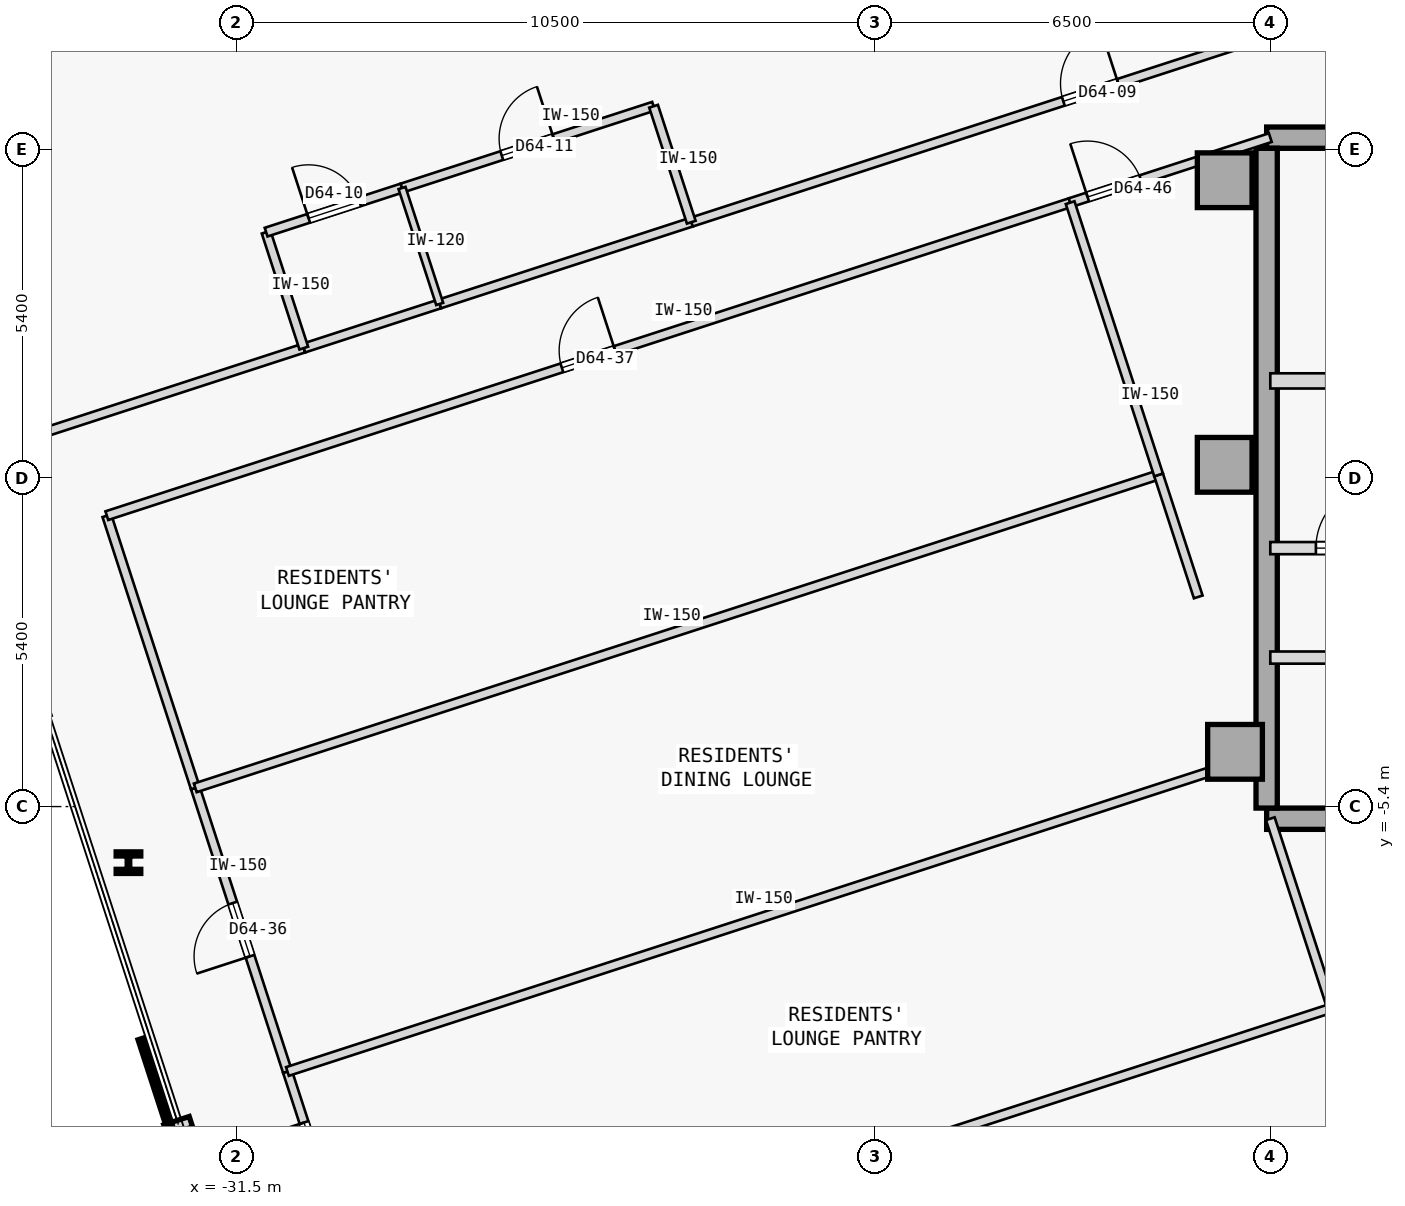
"""IFC4 building model, lengths in metres.
Left out: names, types, materials, properties, quantities, classifications, styles, units other than length and angle.
Written with IfcOpenShell. Run it as: python <this file> out.ifc"""

import sys

from ifc_helpers import new_model, si_unit, direction, frame, frame_2d, origin, origin_2d, place, context, subcontext, project, spatial, rectangle, i_section, extrude, element, fill, save


model = new_model("IFC4")
c1 = context("Model", 3, precision=1e-05, world=origin(), true_north=direction((0.0, 1.0)))
c2 = subcontext(c1, "Body", "Model", "MODEL_VIEW")
j1 = project(units=[si_unit("LENGTHUNIT", "METRE"), si_unit("PLANEANGLEUNIT", "RADIAN")], contexts=[c1])
p1 = place(None, origin())
s1 = spatial("IfcSite", under=j1, at=p1, CompositionType="ELEMENT")
p2 = place(p1, origin())
s2 = spatial("IfcBuilding", under=s1, at=p2, CompositionType="ELEMENT")
p3 = place(p2, frame((0.0, 0.0, 241.05)))
s3 = spatial("IfcBuildingStorey", under=s2, at=p3, CompositionType="ELEMENT", Elevation=241.05)
for number, where, z_axis, x_axis in (
    (1, (-15.25, 4.9, 0.0), (0.0, 0.0, 1.0), (1.0, 0.0, 0.0)),
    (2, (-15.25, 0.22, 0.0), (0.0, 0.0, 1.0), (1.0, 0.0, 0.0)),
    (3, (-15.08, -4.5, 0.0), (0.0, 0.0, 1.0), (1.0, 0.0, 0.0)),
):
    element("IfcColumn", number, at=place(p3, frame(where, z_axis=z_axis, x_axis=x_axis)), inside=s3, PredefinedType="COLUMN", context=c2, shape_type="SweptSolid", body=[
        extrude(rectangle(XDim=0.9, YDim=0.9, at=origin_2d()), origin(), (0.0, 0.0, 1.0), 3.35),
    ])
p4 = place(p3, frame((-14.56, 5.6, 0.0), z_axis=(0.0, 0.0, 1.0), x_axis=(1.0, 0.0, 0.0)))
e4 = element("IfcWall", 4, at=p4, inside=s3, PredefinedType="SHEAR", context=c2, shape_type="SweptSolid", body=[
    extrude(rectangle(XDim=11.41, YDim=0.35, at=frame_2d((5.705, 0.0))), origin(), (0.0, 0.0, 1.0), 3.125),
])
p5 = place(p3, frame((-14.56, -5.6, 0.0), z_axis=(0.0, 0.0, 1.0), x_axis=(1.0, 0.0, 0.0)))
e5 = element("IfcWall", 5, at=p5, inside=s3, PredefinedType="SHEAR", context=c2, shape_type="SweptSolid", body=[
    extrude(rectangle(XDim=10.86, YDim=0.35, at=frame_2d((5.43, 0.0))), origin(), (0.0, 0.0, 1.0), 3.125),
])
p6 = place(p3, frame((-14.56, -5.425, 0.0), z_axis=(0.0, 0.0, 1.0), x_axis=(0.0, 1.0, 0.0)))
e6 = element("IfcWall", 6, at=p6, inside=s3, PredefinedType="SHEAR", context=c2, shape_type="SweptSolid", body=[
    extrude(rectangle(XDim=10.85, YDim=0.35, at=frame_2d((5.425, 0.0))), origin(), (0.0, 0.0, 1.0), 3.125),
])
p7 = place(p3, frame((-33.278, -6.322, 0.0), z_axis=(0.0, 0.0, 1.0), x_axis=(1.0, 0.0, 0.0)))
e7 = element("IfcColumn", 7, at=p7, inside=s3, PredefinedType="COLUMN", context=c2, shape_type="SweptSolid", body=[
    extrude(i_section(OverallWidth=0.405, OverallDepth=0.355, WebThickness=0.042, FlangeThickness=0.068, FilletRadius=0.015, at=origin_2d()), origin(), (0.0, 0.0, 1.0), 3.35),
])
p8 = place(p3, frame((-14.5, 1.6, 0.0), z_axis=(0.0, 0.0, 1.0), x_axis=(1.0, 0.0, 0.0)))
e8 = element("IfcWall", 8, at=p8, inside=s3, PredefinedType="STANDARD", context=c2, shape_type="SweptSolid", body=[
    extrude(rectangle(XDim=3.6, YDim=0.25, at=frame_2d((1.8, 0.0))), origin(), (0.0, 0.0, 1.0), 3.125),
])
p9 = place(p8, frame((0.92, 0.0, 0.0)))
e9 = element("IfcOpeningElement", 9, at=p9, cuts=e8, PredefinedType="OPENING", context=c2, shape_type="SweptSolid", body=[
    extrude(rectangle(XDim=1.05, YDim=2.15, at=frame_2d((0.525, 1.075))), frame((0.0, 0.135, 0.0), z_axis=(0.0, -1.0, 0.0), x_axis=(1.0, 0.0, 0.0)), (0.0, 0.0, 1.0), 0.27),
])
p10 = place(p3, frame((-14.5, -1.15, 0.0), z_axis=(0.0, 0.0, 1.0), x_axis=(1.0, 0.0, 0.0)))
e10 = element("IfcWall", 10, at=p10, inside=s3, PredefinedType="STANDARD", context=c2, shape_type="SweptSolid", body=[
    extrude(rectangle(XDim=2.95, YDim=0.2, at=frame_2d((1.475, 0.0))), origin(), (0.0, 0.0, 1.0), 3.125),
])
p11 = place(p10, frame((0.75, 0.0, 0.0)))
e11 = element("IfcOpeningElement", 11, at=p11, cuts=e10, PredefinedType="OPENING", context=c2, shape_type="SweptSolid", body=[
    extrude(rectangle(XDim=1.05, YDim=2.18, at=frame_2d((0.525, 1.09))), frame((0.0, 0.11, 0.0), z_axis=(0.0, -1.0, 0.0), x_axis=(1.0, 0.0, 0.0)), (0.0, 0.0, 1.0), 0.22),
])
p12 = place(p3, frame((-14.5, -2.95, 0.0), z_axis=(0.0, 0.0, 1.0), x_axis=(1.0, 0.0, 0.0)))
e12 = element("IfcWall", 12, at=p12, inside=s3, PredefinedType="STANDARD", context=c2, shape_type="SweptSolid", body=[
    extrude(rectangle(XDim=10.8, YDim=0.2, at=frame_2d((5.4, 0.0))), origin(), (0.0, 0.0, 1.0), 3.125),
])
p13 = place(p12, frame((9.17, 0.0, 0.0)))
e13 = element("IfcOpeningElement", 13, at=p13, cuts=e12, PredefinedType="OPENING", context=c2, shape_type="SweptSolid", body=[
    extrude(rectangle(XDim=1.1, YDim=2.15, at=frame_2d((0.55, 1.075))), frame((0.0, 0.11, 0.0), z_axis=(0.0, -1.0, 0.0), x_axis=(1.0, 0.0, 0.0)), (0.0, 0.0, 1.0), 0.22),
])
p14 = place(p12, frame((2.13, 0.0, 0.0)))
e14 = element("IfcOpeningElement", 14, at=p14, cuts=e12, PredefinedType="OPENING", context=c2, shape_type="SweptSolid", body=[
    extrude(rectangle(XDim=0.92, YDim=2.15, at=frame_2d((0.46, 1.075))), frame((0.0, 0.11, 0.0), z_axis=(0.0, -1.0, 0.0), x_axis=(1.0, 0.0, 0.0)), (0.0, 0.0, 1.0), 0.22),
])
p15 = place(p12, frame((6.45, 0.0, 0.0)))
e15 = element("IfcOpeningElement", 15, at=p15, cuts=e12, PredefinedType="OPENING", context=c2, shape_type="SweptSolid", body=[
    extrude(rectangle(XDim=0.92, YDim=2.15, at=frame_2d((0.46, 1.075))), frame((0.0, 0.11, 0.0), z_axis=(0.0, -1.0, 0.0), x_axis=(1.0, 0.0, 0.0)), (0.0, 0.0, 1.0), 0.22),
])
p16 = place(p3, frame((-36.012, 0.314, 0.0), z_axis=(0.0, 0.0, 1.0), x_axis=(0.951065348244, 0.308989811111, 0.0)))
e16 = element("IfcWall", 16, at=p16, inside=s3, PredefinedType="PARTITIONING", context=c2, shape_type="SweptSolid", body=[
    extrude(rectangle(XDim=5.907, YDim=0.15, at=frame_2d((2.954, 0.0))), origin(), (0.0, 0.0, 1.0), 3.125),
])
p17 = place(p3, frame((-24.022, 4.21, 0.0), z_axis=(0.0, 0.0, 1.0), x_axis=(0.951058997127, 0.309009359055, 0.0)))
e17 = element("IfcWall", 17, at=p17, inside=s3, PredefinedType="PARTITIONING", context=c2, shape_type="SweptSolid", body=[
    extrude(rectangle(XDim=13.817, YDim=0.15, at=frame_2d((6.908, 0.0))), origin(), (0.0, 0.0, 1.0), 3.125),
])
p18 = place(p17, frame((6.434, 0.0, 0.0)))
e18 = element("IfcOpeningElement", 18, at=p18, cuts=e17, PredefinedType="OPENING", context=c2, shape_type="SweptSolid", body=[
    extrude(rectangle(XDim=0.95, YDim=2.15, at=frame_2d((0.475, 1.075))), frame((0.0, 0.085, 0.0), z_axis=(0.0, -1.0, 0.0), x_axis=(1.0, 0.0, 0.0)), (0.0, 0.0, 1.0), 0.17),
])
p19 = place(p3, frame((-30.394, 2.139, 0.0), z_axis=(0.0, 0.0, 1.0), x_axis=(0.951045519245, 0.309050837767, 0.0)))
e19 = element("IfcWall", 19, at=p19, inside=s3, PredefinedType="PARTITIONING", context=c2, shape_type="SweptSolid", body=[
    extrude(rectangle(XDim=2.35, YDim=0.15, at=frame_2d((1.175, 0.0))), origin(), (0.0, 0.0, 1.0), 3.125),
])
p20 = place(p3, frame((-28.159, 2.866, 0.0), z_axis=(0.0, 0.0, 1.0), x_axis=(0.951052627573, 0.309028962374, 0.0)))
e20 = element("IfcWall", 20, at=p20, inside=s3, PredefinedType="PARTITIONING", context=c2, shape_type="SweptSolid", body=[
    extrude(rectangle(XDim=4.35, YDim=0.15, at=frame_2d((2.175, 0.0))), origin(), (0.0, 0.0, 1.0), 3.125),
])
p21 = place(p3, frame((-29.833, -12.311, 0.0), z_axis=(0.0, 0.0, 1.0), x_axis=(-0.309044953986, 0.951047431213, 0.0)))
e21 = element("IfcWall", 21, at=p21, inside=s3, PredefinedType="PARTITIONING", context=c2, shape_type="SweptSolid", body=[
    extrude(rectangle(XDim=2.685, YDim=0.15, at=frame_2d((1.343, 0.0))), origin(), (0.0, 0.0, 1.0), 3.125),
])
p22 = place(p21, frame((0.883, 0.0, 0.0)))
e22 = element("IfcOpeningElement", 22, at=p22, cuts=e21, PredefinedType="OPENING", context=c2, shape_type="SweptSolid", body=[
    extrude(rectangle(XDim=0.92, YDim=2.15, at=frame_2d((0.46, 1.075))), frame((0.0, 0.085, 0.0), z_axis=(0.0, -1.0, 0.0), x_axis=(1.0, 0.0, 0.0)), (0.0, 0.0, 1.0), 0.17),
])
p23 = place(p3, frame((-30.663, -9.757, 0.0), z_axis=(0.0, 0.0, 1.0), x_axis=(-0.309019653166, 0.951055652397, 0.0)))
e23 = element("IfcWall", 23, at=p23, inside=s3, PredefinedType="PARTITIONING", context=c2, shape_type="SweptSolid", body=[
    extrude(rectangle(XDim=4.904, YDim=0.15, at=frame_2d((2.452, 0.0))), origin(), (0.0, 0.0, 1.0), 3.125),
])
p24 = place(p23, frame((1.992, 0.0, 0.0)))
e24 = element("IfcOpeningElement", 24, at=p24, cuts=e23, PredefinedType="OPENING", context=c2, shape_type="SweptSolid", body=[
    extrude(rectangle(XDim=0.92, YDim=2.15, at=frame_2d((0.46, 1.075))), frame((0.0, 0.085, 0.0), z_axis=(0.0, -1.0, 0.0), x_axis=(1.0, 0.0, 0.0)), (0.0, 0.0, 1.0), 0.17),
])
p25 = place(p3, frame((-32.179, -5.093, 0.0), z_axis=(0.0, 0.0, 1.0), x_axis=(-0.309014532869, 0.951057316083, 0.0)))
e25 = element("IfcWall", 25, at=p25, inside=s3, PredefinedType="PARTITIONING", context=c2, shape_type="SweptSolid", body=[
    extrude(rectangle(XDim=4.707, YDim=0.15, at=frame_2d((2.354, 0.0))), origin(), (0.0, 0.0, 1.0), 3.125),
])
p26 = place(p3, frame((-33.633, -0.616, 0.0), z_axis=(0.0, 0.0, 1.0), x_axis=(0.951058192995, 0.309011833974, 0.0)))
e26 = element("IfcWall", 26, at=p26, inside=s3, PredefinedType="PARTITIONING", context=c2, shape_type="SweptSolid", body=[
    extrude(rectangle(XDim=16.657, YDim=0.15, at=frame_2d((8.329, 0.0))), origin(), (0.0, 0.0, 1.0), 3.125),
])
p27 = place(p26, frame((7.868, 0.0, 0.0)))
e27 = element("IfcOpeningElement", 27, at=p27, cuts=e26, PredefinedType="OPENING", context=c2, shape_type="SweptSolid", body=[
    extrude(rectangle(XDim=0.92, YDim=2.15, at=frame_2d((0.46, 1.075))), frame((0.0, 0.085, 0.0), z_axis=(0.0, -1.0, 0.0), x_axis=(1.0, 0.0, 0.0)), (0.0, 0.0, 1.0), 0.17),
])
p28 = place(p3, frame((-17.792, 4.531, 0.0), z_axis=(0.0, 0.0, 1.0), x_axis=(0.951047546178, 0.309044600193, 0.0)))
e28 = element("IfcWall", 28, at=p28, inside=s3, PredefinedType="PARTITIONING", context=c2, shape_type="SweptSolid", body=[
    extrude(rectangle(XDim=3.461, YDim=0.15, at=frame_2d((1.73, 0.0))), origin(), (0.0, 0.0, 1.0), 3.125),
])
p29 = place(p28, frame((0.302, 0.0, 0.0)))
e29 = element("IfcOpeningElement", 29, at=p29, cuts=e28, PredefinedType="OPENING", context=c2, shape_type="SweptSolid", body=[
    extrude(rectangle(XDim=0.92, YDim=2.15, at=frame_2d((0.46, 1.075))), frame((0.0, 0.085, 0.0), z_axis=(0.0, -1.0, 0.0), x_axis=(1.0, 0.0, 0.0)), (0.0, 0.0, 1.0), 0.17),
])
p30 = place(p3, frame((-30.394, 2.139, 0.0), z_axis=(0.0, 0.0, 1.0), x_axis=(-0.309022749039, 0.951054646472, 0.0)))
e30 = element("IfcWall", 30, at=p30, inside=s3, PredefinedType="PARTITIONING", context=c2, shape_type="SweptSolid", body=[
    extrude(rectangle(XDim=2.005, YDim=0.15, at=frame_2d((1.002, 0.0))), origin(), (0.0, 0.0, 1.0), 3.125),
])
p31 = place(p3, frame((-31.014, 4.046, 0.0), z_axis=(0.0, 0.0, 1.0), x_axis=(0.951076048914, 0.308956872689, 0.0)))
e31 = element("IfcWall", 31, at=p31, inside=s3, PredefinedType="PARTITIONING", context=c2, shape_type="SweptSolid", body=[
    extrude(rectangle(XDim=2.35, YDim=0.15, at=frame_2d((1.175, 0.0))), origin(), (0.0, 0.0, 1.0), 3.125),
])
p32 = place(p31, frame((0.735, 0.0, 0.0)))
e32 = element("IfcOpeningElement", 32, at=p32, cuts=e31, PredefinedType="OPENING", context=c2, shape_type="SweptSolid", body=[
    extrude(rectangle(XDim=0.88, YDim=2.15, at=frame_2d((0.44, 1.075))), frame((0.0, 0.085, 0.0), z_axis=(0.0, -1.0, 0.0), x_axis=(1.0, 0.0, 0.0)), (0.0, 0.0, 1.0), 0.17),
])
p33 = place(p3, frame((-28.779, 4.772, 0.0), z_axis=(0.0, 0.0, 1.0), x_axis=(0.951052627573, 0.309028962374, 0.0)))
e33 = element("IfcWall", 33, at=p33, inside=s3, PredefinedType="PARTITIONING", context=c2, shape_type="SweptSolid", body=[
    extrude(rectangle(XDim=4.35, YDim=0.15, at=frame_2d((2.175, 0.0))), origin(), (0.0, 0.0, 1.0), 3.125),
])
p34 = place(p33, frame((1.725, 0.0, 0.0)))
e34 = element("IfcOpeningElement", 34, at=p34, cuts=e33, PredefinedType="OPENING", context=c2, shape_type="SweptSolid", body=[
    extrude(rectangle(XDim=0.9, YDim=2.15, at=frame_2d((0.45, 1.075))), frame((0.0, 0.085, 0.0), z_axis=(0.0, -1.0, 0.0), x_axis=(1.0, 0.0, 0.0)), (0.0, 0.0, 1.0), 0.17),
])
p35 = place(p3, frame((-24.022, 4.21, 0.0), z_axis=(0.0, 0.0, 1.0), x_axis=(-0.309058537449, 0.951043017129, 0.0)))
e35 = element("IfcWall", 35, at=p35, inside=s3, PredefinedType="PARTITIONING", context=c2, shape_type="SweptSolid", body=[
    extrude(rectangle(XDim=2.005, YDim=0.15, at=frame_2d((1.002, 0.0))), origin(), (0.0, 0.0, 1.0), 3.125),
])
p36 = place(p3, frame((-28.159, 2.866, 0.0), z_axis=(0.0, 0.0, 1.0), x_axis=(-0.309058537449, 0.951043017129, 0.0)))
e36 = element("IfcWall", 36, at=p36, inside=s3, PredefinedType="PARTITIONING", context=c2, shape_type="SweptSolid", body=[
    extrude(rectangle(XDim=2.005, YDim=0.12, at=frame_2d((1.002, 0.0))), origin(), (0.0, 0.0, 1.0), 3.125),
])
p37 = place(p3, frame((-31.208, -14.471, 0.0), z_axis=(0.0, 0.0, 1.0), x_axis=(0.951057753948, 0.309013185244, 0.0)))
e37 = element("IfcWall", 37, at=p37, inside=s3, PredefinedType="PARTITIONING", context=c2, shape_type="SweptSolid", body=[
    extrude(rectangle(XDim=18.632, YDim=0.15, at=frame_2d((9.316, 0.0))), origin(), (0.0, 0.0, 1.0), 3.125),
])
p38 = place(p3, frame((-30.663, -9.757, 0.0), z_axis=(0.0, 0.0, 1.0), x_axis=(0.951058192995, 0.309011833974, 0.0)))
e38 = element("IfcWall", 38, at=p38, inside=s3, PredefinedType="PARTITIONING", context=c2, shape_type="SweptSolid", body=[
    extrude(rectangle(XDim=16.657, YDim=0.15, at=frame_2d((8.329, 0.0))), origin(), (0.0, 0.0, 1.0), 3.125),
])
p39 = place(p3, frame((-13.488, -8.713, 0.0), z_axis=(0.0, 0.0, 1.0), x_axis=(-0.309082700143, 0.951035164687, 0.0)))
e39 = element("IfcWall", 39, at=p39, inside=s3, PredefinedType="PARTITIONING", context=c2, shape_type="SweptSolid", body=[
    extrude(rectangle(XDim=3.274, YDim=0.15, at=frame_2d((1.637, 0.0))), origin(), (0.0, 0.0, 1.0), 3.125),
])
p40 = place(p3, frame((-32.179, -5.093, 0.0), z_axis=(0.0, 0.0, 1.0), x_axis=(0.951053885426, 0.309025091239, 0.0)))
e40 = element("IfcWall", 40, at=p40, inside=s3, PredefinedType="PARTITIONING", context=c2, shape_type="SweptSolid", body=[
    extrude(rectangle(XDim=16.657, YDim=0.15, at=frame_2d((8.329, 0.0))), origin(), (0.0, 0.0, 1.0), 3.125),
])
p41 = place(p3, frame((-15.685, -1.952, 0.0), z_axis=(0.0, 0.0, 1.0), x_axis=(-0.308929092959, 0.951085072706, 0.0)))
e41 = element("IfcWall", 41, at=p41, inside=s3, PredefinedType="PARTITIONING", context=c2, shape_type="SweptSolid", body=[
    extrude(rectangle(XDim=2.11, YDim=0.15, at=frame_2d((1.055, 0.0))), origin(), (0.0, 0.0, 1.0), 3.125),
])
p42 = place(p3, frame((-16.337, 0.054, 0.0), z_axis=(0.0, 0.0, 1.0), x_axis=(-0.309029776355, 0.951052363083, 0.0)))
e42 = element("IfcWall", 42, at=p42, inside=s3, PredefinedType="PARTITIONING", context=c2, shape_type="SweptSolid", body=[
    extrude(rectangle(XDim=4.707, YDim=0.15, at=frame_2d((2.354, 0.0))), origin(), (0.0, 0.0, 1.0), 3.125),
])
p43 = place(p11, origin())
e43 = element("IfcDoor", 43, at=p43, inside=s3, OperationType="SINGLE_SWING_RIGHT", PredefinedType="DOOR", context=c2, shape_type="SweptSolid", body=[
    extrude(rectangle(XDim=1.05, YDim=2.18, at=frame_2d((0.525, 1.09))), frame((0.0, 0.025, 0.0), z_axis=(0.0, -1.0, 0.0), x_axis=(1.0, 0.0, 0.0)), (0.0, 0.0, 1.0), 0.05),
])
fill(e11, e43)
p44 = place(p18, origin())
e44 = element("IfcDoor", 44, at=p44, inside=s3, OperationType="SINGLE_SWING_RIGHT", PredefinedType="DOOR", context=c2, shape_type="SweptSolid", body=[
    extrude(rectangle(XDim=0.95, YDim=2.15, at=frame_2d((0.475, 1.075))), frame((0.0, 0.025, 0.0), z_axis=(0.0, -1.0, 0.0), x_axis=(1.0, 0.0, 0.0)), (0.0, 0.0, 1.0), 0.05),
])
fill(e18, e44)
p45 = place(p32, origin())
e45 = element("IfcDoor", 45, at=p45, inside=s3, OperationType="SINGLE_SWING_LEFT", PredefinedType="DOOR", context=c2, shape_type="SweptSolid", body=[
    extrude(rectangle(XDim=0.88, YDim=2.15, at=frame_2d((0.44, 1.075))), frame((0.0, 0.025, 0.0), z_axis=(0.0, -1.0, 0.0), x_axis=(1.0, 0.0, 0.0)), (0.0, 0.0, 1.0), 0.05),
])
fill(e32, e45)
p46 = place(p34, origin())
e46 = element("IfcDoor", 46, at=p46, inside=s3, OperationType="SINGLE_SWING_RIGHT", PredefinedType="DOOR", context=c2, shape_type="SweptSolid", body=[
    extrude(rectangle(XDim=0.9, YDim=2.15, at=frame_2d((0.45, 1.075))), frame((0.0, 0.025, 0.0), z_axis=(0.0, -1.0, 0.0), x_axis=(1.0, 0.0, 0.0)), (0.0, 0.0, 1.0), 0.05),
])
fill(e34, e46)
p47 = place(p22, origin())
e47 = element("IfcDoor", 47, at=p47, inside=s3, OperationType="SINGLE_SWING_RIGHT", PredefinedType="DOOR", context=c2, shape_type="SweptSolid", body=[
    extrude(rectangle(XDim=0.92, YDim=2.15, at=frame_2d((0.46, 1.075))), frame((0.0, 0.025, 0.0), z_axis=(0.0, -1.0, 0.0), x_axis=(1.0, 0.0, 0.0)), (0.0, 0.0, 1.0), 0.05),
])
fill(e22, e47)
p48 = place(p24, origin())
e48 = element("IfcDoor", 48, at=p48, inside=s3, OperationType="SINGLE_SWING_LEFT", PredefinedType="DOOR", context=c2, shape_type="SweptSolid", body=[
    extrude(rectangle(XDim=0.92, YDim=2.15, at=frame_2d((0.46, 1.075))), frame((0.0, 0.025, 0.0), z_axis=(0.0, -1.0, 0.0), x_axis=(1.0, 0.0, 0.0)), (0.0, 0.0, 1.0), 0.05),
])
fill(e24, e48)
p49 = place(p27, origin())
e49 = element("IfcDoor", 49, at=p49, inside=s3, OperationType="SINGLE_SWING_RIGHT", PredefinedType="DOOR", context=c2, shape_type="SweptSolid", body=[
    extrude(rectangle(XDim=0.92, YDim=2.15, at=frame_2d((0.46, 1.075))), frame((0.0, 0.025, 0.0), z_axis=(0.0, -1.0, 0.0), x_axis=(1.0, 0.0, 0.0)), (0.0, 0.0, 1.0), 0.05),
])
fill(e27, e49)
p50 = place(p29, origin())
e50 = element("IfcDoor", 50, at=p50, inside=s3, OperationType="SINGLE_SWING_LEFT", PredefinedType="DOOR", context=c2, shape_type="SweptSolid", body=[
    extrude(rectangle(XDim=0.92, YDim=2.15, at=frame_2d((0.46, 1.075))), frame((0.0, 0.025, 0.0), z_axis=(0.0, -1.0, 0.0), x_axis=(1.0, 0.0, 0.0)), (0.0, 0.0, 1.0), 0.05),
])
fill(e29, e50)
save(model, sys.argv[1])
